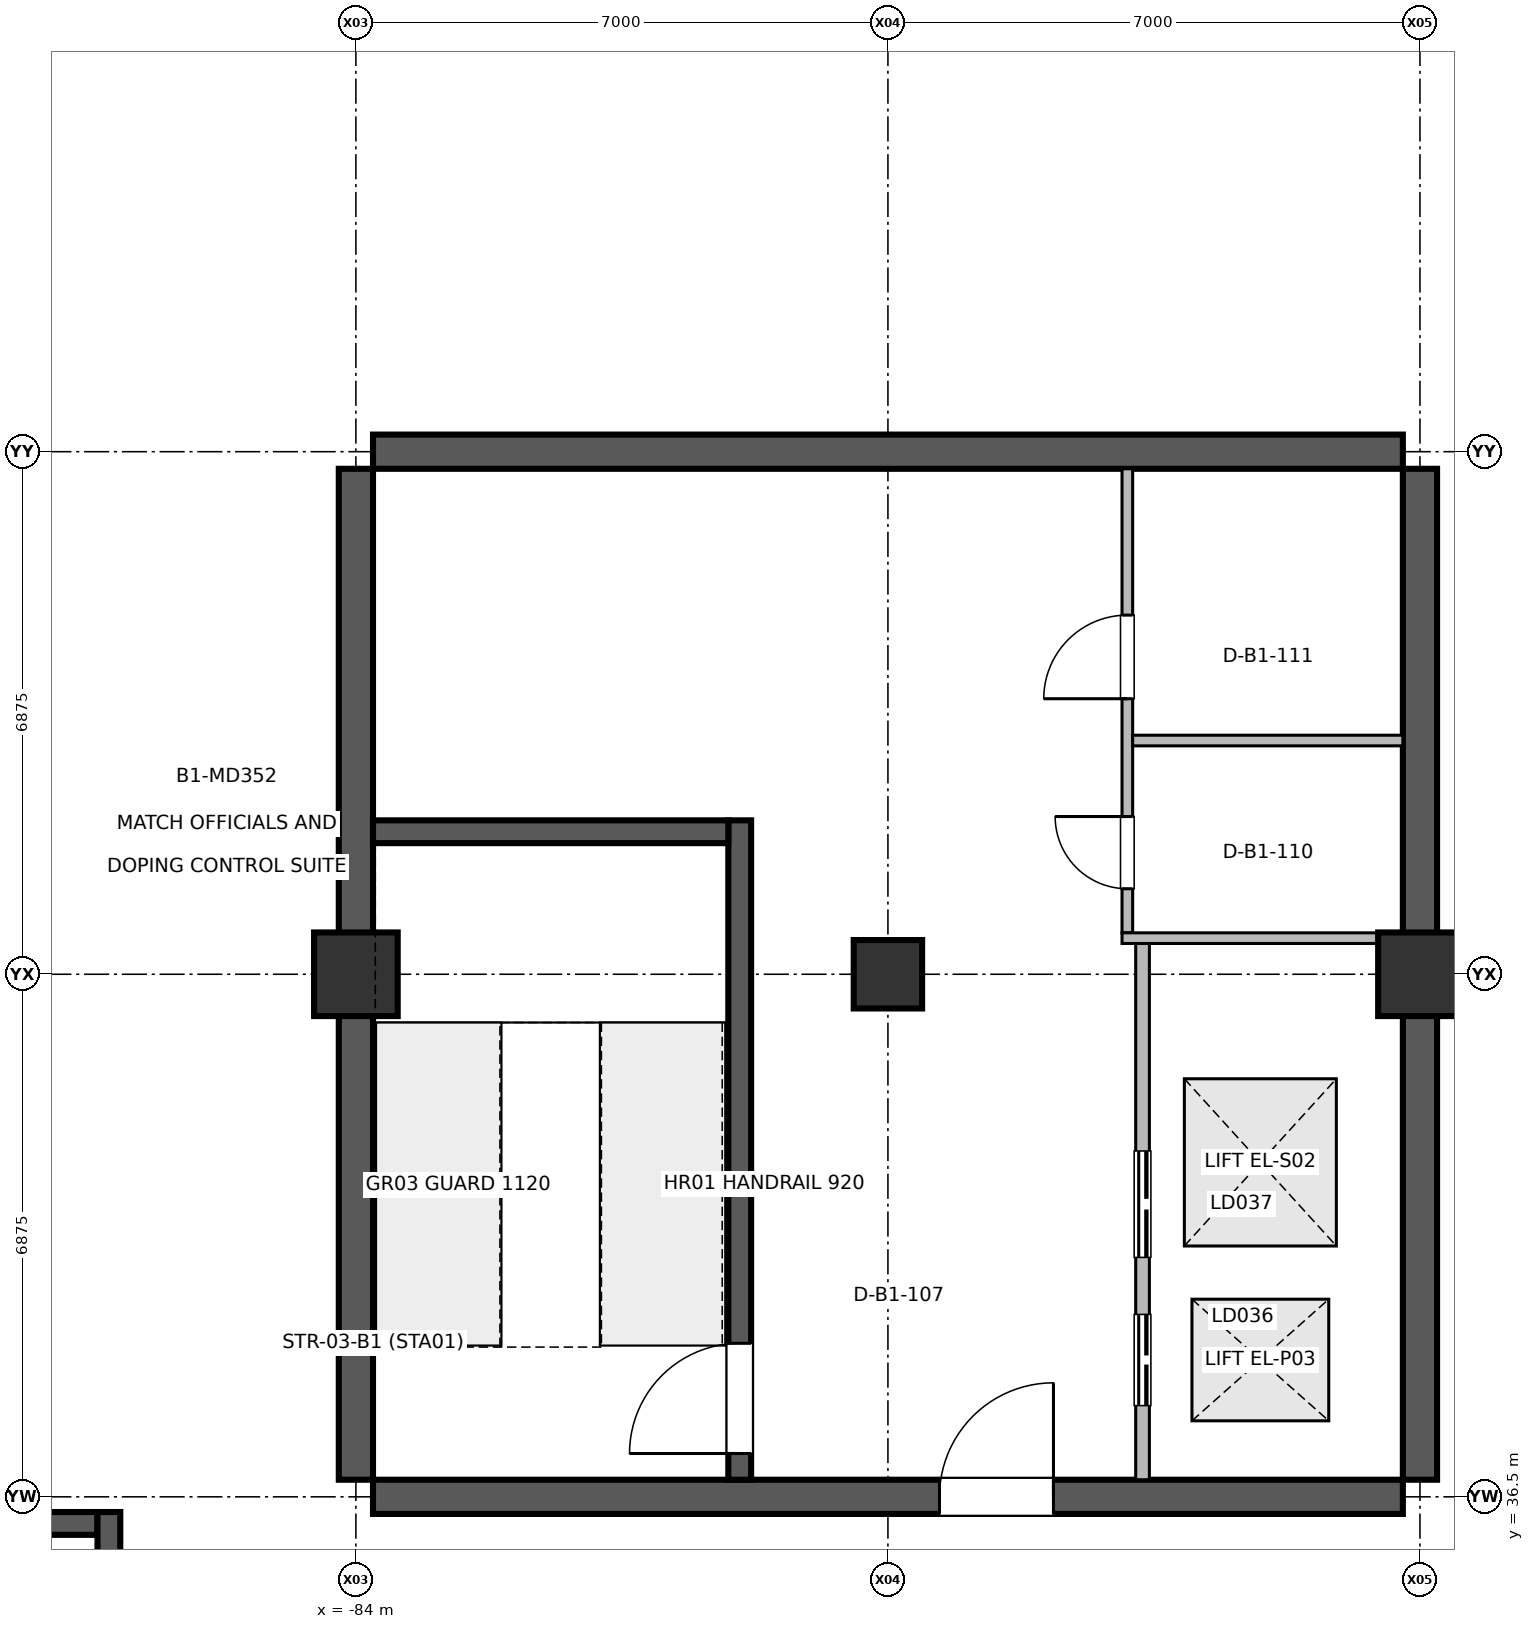
"""IFC4 building model, lengths in metres.
Left out: names, types, materials, properties, quantities, classifications, styles, units other than length and angle.
Written with IfcOpenShell. Run it as: python <this file> out.ifc"""

import sys

from ifc_helpers import new_model, si_unit, direction, frame, frame_2d, origin, origin_2d, place, context, subcontext, project, spatial, rectangle, extrude, element, fill, save


model = new_model("IFC4")
c1 = context("Model", 3, precision=1e-05, world=origin(), true_north=direction((0.0, 1.0)))
c2 = subcontext(c1, "Body", "Model", "MODEL_VIEW")
j1 = project(units=[si_unit("LENGTHUNIT", "METRE"), si_unit("PLANEANGLEUNIT", "RADIAN")], contexts=[c1])
p1 = place(None, origin())
s1 = spatial("IfcSite", under=j1, at=p1, CompositionType="ELEMENT")
p2 = place(p1, origin())
s2 = spatial("IfcBuilding", under=s1, at=p2, CompositionType="ELEMENT")
p3 = place(p2, frame((0.0, 0.0, -6.0)))
s3 = spatial("IfcBuildingStorey", under=s2, at=p3, CompositionType="ELEMENT", Elevation=-6.0)
p4 = place(p3, frame((-84.0, 43.375, 0.0), z_axis=(0.0, 0.0, 1.0), x_axis=(1.0, 0.0, 0.0)))
e1 = element("IfcColumn", 1, at=p4, inside=s3, PredefinedType="COLUMN", context=c2, shape_type="SweptSolid", body=[
    extrude(rectangle(XDim=1.1, YDim=1.1, at=origin_2d()), origin(), (0.0, 0.0, 1.0), 5.998),
])
p5 = place(p3, frame((-77.0, 43.375, 0.0), z_axis=(0.0, 0.0, 1.0), x_axis=(1.0, 0.0, 0.0)))
e2 = element("IfcColumn", 2, at=p5, inside=s3, PredefinedType="COLUMN", context=c2, shape_type="SweptSolid", body=[
    extrude(rectangle(XDim=0.9, YDim=0.9, at=origin_2d()), origin(), (0.0, 0.0, 1.0), 5.998),
])
p6 = place(p3, frame((-70.0, 43.375, 0.0), z_axis=(0.0, 0.0, 1.0), x_axis=(1.0, 0.0, 0.0)))
e3 = element("IfcColumn", 3, at=p6, inside=s3, PredefinedType="COLUMN", context=c2, shape_type="SweptSolid", body=[
    extrude(rectangle(XDim=1.1, YDim=1.1, at=origin_2d()), origin(), (0.0, 0.0, 1.0), 5.998),
])
for number, where, z_axis, x_axis in (
    (4, (-84.0, 36.725, 0.0), (0.0, 0.0, 1.0), (0.0, 1.0, 0.0)),
    (5, (-70.0, 36.725, 0.0), (0.0, 0.0, 1.0), (0.0, 1.0, 0.0)),
):
    element("IfcWall", number, at=place(p3, frame(where, z_axis=z_axis, x_axis=x_axis)), inside=s3, PredefinedType="SHEAR", context=c2, shape_type="SweptSolid", body=[
        extrude(rectangle(XDim=13.3, YDim=0.45, at=frame_2d((6.65, 0.0))), origin(), (0.0, 0.0, 1.0), 5.75),
    ])
p7 = place(p3, frame((-83.775, 36.5, 0.0), z_axis=(0.0, 0.0, 1.0), x_axis=(1.0, 0.0, 0.0)))
e6 = element("IfcWall", 6, at=p7, inside=s3, PredefinedType="SHEAR", context=c2, shape_type="SweptSolid", body=[
    extrude(rectangle(XDim=13.55, YDim=0.45, at=frame_2d((6.775, 0.0))), origin(), (0.0, 0.0, 1.0), 5.75),
])
p8 = place(p7, frame((7.453, 0.0, 0.0)))
e7 = element("IfcOpeningElement", 7, at=p8, cuts=e6, PredefinedType="OPENING", context=c2, shape_type="SweptSolid", body=[
    extrude(rectangle(XDim=1.5, YDim=2.2, at=frame_2d((0.75, 1.1))), frame((0.0, 0.235, 0.0), z_axis=(0.0, -1.0, 0.0), x_axis=(1.0, 0.0, 0.0)), (0.0, 0.0, 1.0), 0.47),
])
p9 = place(p3, frame((-83.775, 50.25, 0.0), z_axis=(0.0, 0.0, 1.0), x_axis=(1.0, 0.0, 0.0)))
e8 = element("IfcWall", 8, at=p9, inside=s3, PredefinedType="SHEAR", context=c2, shape_type="SweptSolid", body=[
    extrude(rectangle(XDim=13.55, YDim=0.45, at=frame_2d((6.775, 0.0))), origin(), (0.0, 0.0, 1.0), 5.75),
])
p10 = place(p3, frame((-78.95, 36.725, 0.0), z_axis=(0.0, 0.0, 1.0), x_axis=(0.0, 1.0, 0.0)))
e9 = element("IfcWall", 9, at=p10, inside=s3, PredefinedType="SHEAR", context=c2, shape_type="SweptSolid", body=[
    extrude(rectangle(XDim=8.675, YDim=0.3, at=frame_2d((4.337, 0.0))), origin(), (0.0, 0.0, 1.0), 5.75),
])
p11 = place(p10, frame((0.345, 0.0, 0.0)))
e10 = element("IfcOpeningElement", 10, at=p11, cuts=e9, PredefinedType="OPENING", context=c2, shape_type="SweptSolid", body=[
    extrude(rectangle(XDim=1.45, YDim=2.2, at=frame_2d((0.725, 1.1))), frame((0.0, 0.16, 0.0), z_axis=(0.0, -1.0, 0.0), x_axis=(1.0, 0.0, 0.0)), (0.0, 0.0, 1.0), 0.32),
])
p12 = place(p3, frame((-73.65, 36.725, 0.0), z_axis=(0.0, 0.0, 1.0), x_axis=(0.0, 1.0, 0.0)))
e11 = element("IfcWall", 11, at=p12, inside=s3, PredefinedType="PARTITIONING", context=c2, shape_type="SweptSolid", body=[
    extrude(rectangle(XDim=7.055, YDim=0.18, at=frame_2d((3.527, 0.0))), origin(), (0.0, 0.0, 1.0), 4.125),
])
p13 = place(p12, frame((0.975, 0.0, 0.0)))
e12 = element("IfcOpeningElement", 12, at=p13, cuts=e11, PredefinedType="OPENING", context=c2, shape_type="SweptSolid", body=[
    extrude(rectangle(XDim=1.2, YDim=2.25, at=frame_2d((0.6, 1.125))), frame((0.0, 0.1, 0.0), z_axis=(0.0, -1.0, 0.0), x_axis=(1.0, 0.0, 0.0)), (0.0, 0.0, 1.0), 0.2),
])
p14 = place(p12, frame((2.925, 0.0, 0.0)))
e13 = element("IfcOpeningElement", 13, at=p14, cuts=e11, PredefinedType="OPENING", context=c2, shape_type="SweptSolid", body=[
    extrude(rectangle(XDim=1.4, YDim=2.3, at=frame_2d((0.7, 1.15))), frame((0.0, 0.1, 0.0), z_axis=(0.0, -1.0, 0.0), x_axis=(1.0, 0.0, 0.0)), (0.0, 0.0, 1.0), 0.2),
])
p15 = place(p3, frame((-73.85, 43.92, 0.0), z_axis=(0.0, 0.0, 1.0), x_axis=(0.0, 1.0, 0.0)))
e14 = element("IfcWall", 14, at=p15, inside=s3, PredefinedType="PARTITIONING", context=c2, shape_type="SweptSolid", body=[
    extrude(rectangle(XDim=6.105, YDim=0.14, at=frame_2d((3.052, 0.0))), origin(), (0.0, 0.0, 1.0), 4.125),
])
p16 = place(p15, frame((0.58, 0.0, 0.0)))
e15 = element("IfcOpeningElement", 15, at=p16, cuts=e14, PredefinedType="OPENING", context=c2, shape_type="SweptSolid", body=[
    extrude(rectangle(XDim=0.95, YDim=2.15, at=frame_2d((0.475, 1.075))), frame((0.0, 0.08, 0.0), z_axis=(0.0, -1.0, 0.0), x_axis=(1.0, 0.0, 0.0)), (0.0, 0.0, 1.0), 0.16),
])
p17 = place(p15, frame((3.08, 0.0, 0.0)))
e16 = element("IfcOpeningElement", 16, at=p17, cuts=e14, PredefinedType="OPENING", context=c2, shape_type="SweptSolid", body=[
    extrude(rectangle(XDim=1.1, YDim=2.15, at=frame_2d((0.55, 1.075))), frame((0.0, 0.08, 0.0), z_axis=(0.0, -1.0, 0.0), x_axis=(1.0, 0.0, 0.0)), (0.0, 0.0, 1.0), 0.16),
])
p18 = place(p3, frame((-73.92, 43.85, 0.0), z_axis=(0.0, 0.0, 1.0), x_axis=(1.0, 0.0, 0.0)))
e17 = element("IfcWall", 17, at=p18, inside=s3, PredefinedType="PARTITIONING", context=c2, shape_type="SweptSolid", body=[
    extrude(rectangle(XDim=3.695, YDim=0.14, at=frame_2d((1.847, 0.0))), origin(), (0.0, 0.0, 1.0), 4.125),
])
p19 = place(p3, frame((-73.78, 46.45, 0.0), z_axis=(0.0, 0.0, 1.0), x_axis=(1.0, 0.0, 0.0)))
e18 = element("IfcWall", 18, at=p19, inside=s3, PredefinedType="PARTITIONING", context=c2, shape_type="SweptSolid", body=[
    extrude(rectangle(XDim=3.555, YDim=0.14, at=frame_2d((1.777, 0.0))), origin(), (0.0, 0.0, 1.0), 5.02),
])
p20 = place(p3, frame((-83.775, 45.25, 0.0), z_axis=(0.0, 0.0, 1.0), x_axis=(1.0, 0.0, 0.0)))
e19 = element("IfcWall", 19, at=p20, inside=s3, PredefinedType="SHEAR", context=c2, shape_type="SweptSolid", body=[
    extrude(rectangle(XDim=4.675, YDim=0.3, at=frame_2d((2.337, 0.0))), origin(), (0.0, 0.0, 1.0), 5.75),
])
p21 = place(p3, frame((-91.6, 36.15, 0.0), z_axis=(0.0, 0.0, 1.0), x_axis=(1.0, 0.0, 0.0)))
e20 = element("IfcWall", 20, at=p21, inside=s3, PredefinedType="SHEAR", context=c2, shape_type="SweptSolid", body=[
    extrude(rectangle(XDim=4.2, YDim=0.3, at=frame_2d((2.1, 0.0))), origin(), (0.0, 0.0, 1.0), 5.75),
])
p22 = place(p3, frame((-87.25, 27.85, 0.0), z_axis=(0.0, 0.0, 1.0), x_axis=(0.0, 1.0, 0.0)))
e21 = element("IfcWall", 21, at=p22, inside=s3, PredefinedType="SHEAR", context=c2, shape_type="SweptSolid", body=[
    extrude(rectangle(XDim=8.45, YDim=0.3, at=frame_2d((4.225, 0.0))), origin(), (0.0, 0.0, 1.0), 5.75),
])
p23 = place(p8, origin())
e22 = element("IfcDoor", 22, at=p23, inside=s3, OperationType="SINGLE_SWING_RIGHT", PredefinedType="DOOR", context=c2, shape_type="SweptSolid", body=[
    extrude(rectangle(XDim=1.5, YDim=2.2, at=frame_2d((0.75, 1.1))), frame((0.0, 0.025, 0.0), z_axis=(0.0, -1.0, 0.0), x_axis=(1.0, 0.0, 0.0)), (0.0, 0.0, 1.0), 0.05),
])
fill(e7, e22)
p24 = place(p11, origin())
e23 = element("IfcDoor", 23, at=p24, inside=s3, OperationType="SINGLE_SWING_LEFT", PredefinedType="DOOR", context=c2, shape_type="SweptSolid", body=[
    extrude(rectangle(XDim=1.45, YDim=2.2, at=frame_2d((0.725, 1.1))), frame((0.0, 0.025, 0.0), z_axis=(0.0, -1.0, 0.0), x_axis=(1.0, 0.0, 0.0)), (0.0, 0.0, 1.0), 0.05),
])
fill(e10, e23)
p25 = place(p13, origin())
e24 = element("IfcDoor", 24, at=p25, inside=s3, OperationType="DOUBLE_DOOR_SLIDING", PredefinedType="DOOR", context=c2, shape_type="SweptSolid", body=[
    extrude(rectangle(XDim=1.2, YDim=2.25, at=frame_2d((0.6, 1.125))), frame((0.0, 0.025, 0.0), z_axis=(0.0, -1.0, 0.0), x_axis=(1.0, 0.0, 0.0)), (0.0, 0.0, 1.0), 0.05),
])
fill(e12, e24)
p26 = place(p14, origin())
e25 = element("IfcDoor", 25, at=p26, inside=s3, OperationType="DOUBLE_DOOR_SLIDING", PredefinedType="DOOR", context=c2, shape_type="SweptSolid", body=[
    extrude(rectangle(XDim=1.4, YDim=2.3, at=frame_2d((0.7, 1.15))), frame((0.0, 0.025, 0.0), z_axis=(0.0, -1.0, 0.0), x_axis=(1.0, 0.0, 0.0)), (0.0, 0.0, 1.0), 0.05),
])
fill(e13, e25)
p27 = place(p16, origin())
e26 = element("IfcDoor", 26, at=p27, inside=s3, OperationType="SINGLE_SWING_RIGHT", PredefinedType="DOOR", context=c2, shape_type="SweptSolid", body=[
    extrude(rectangle(XDim=0.95, YDim=2.15, at=frame_2d((0.475, 1.075))), frame((0.0, 0.025, 0.0), z_axis=(0.0, -1.0, 0.0), x_axis=(1.0, 0.0, 0.0)), (0.0, 0.0, 1.0), 0.05),
])
fill(e15, e26)
p28 = place(p17, origin())
e27 = element("IfcDoor", 27, at=p28, inside=s3, OperationType="SINGLE_SWING_LEFT", PredefinedType="DOOR", context=c2, shape_type="SweptSolid", body=[
    extrude(rectangle(XDim=1.1, YDim=2.15, at=frame_2d((0.55, 1.075))), frame((0.0, 0.025, 0.0), z_axis=(0.0, -1.0, 0.0), x_axis=(1.0, 0.0, 0.0)), (0.0, 0.0, 1.0), 0.05),
])
fill(e16, e27)
save(model, sys.argv[1])
